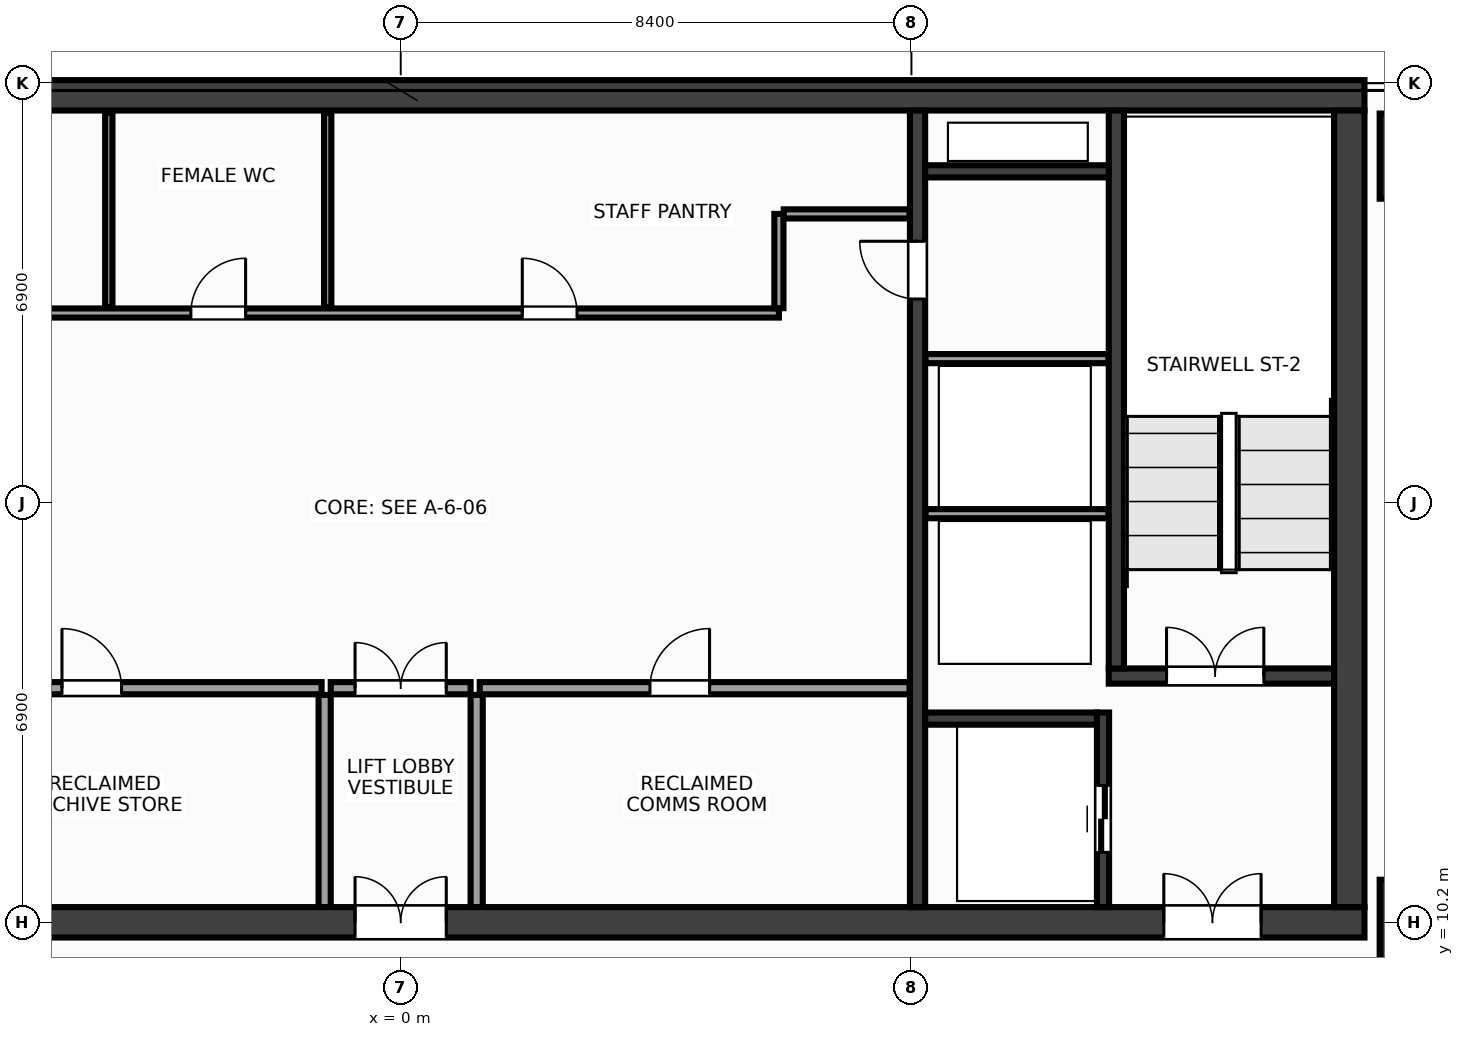
"""IFC4 building model, lengths in metres.
Left out: names, types, materials, properties, quantities, classifications, styles, units other than length and angle.
Written with IfcOpenShell. Run it as: python <this file> out.ifc"""

import sys

from ifc_helpers import new_model, si_unit, direction, frame, frame_2d, origin, origin_2d, place, context, subcontext, project, spatial, rectangle, extrude, source, transform, mapped, element, fill, save


model = new_model("IFC4")
c1 = context("Model", 3, precision=1e-05, world=origin(), true_north=direction((0.0, 1.0)))
c2 = subcontext(c1, "Body", "Model", "MODEL_VIEW")
j1 = project(units=[si_unit("LENGTHUNIT", "METRE"), si_unit("PLANEANGLEUNIT", "RADIAN")], contexts=[c1])
p1 = place(None, origin())
s1 = spatial("IfcSite", under=j1, at=p1, CompositionType="ELEMENT")
p2 = place(p1, origin())
s2 = spatial("IfcBuilding", under=s1, at=p2, CompositionType="ELEMENT")
p3 = place(p2, frame((0.0, 0.0, 196.4)))
s3 = spatial("IfcBuildingStorey", under=s2, at=p3, CompositionType="ELEMENT", Elevation=196.4)
m1 = source(origin(), c2, "Body", "SweptSolid", [
    extrude(rectangle(XDim=31.7, YDim=0.5, at=frame_2d((15.85, 0.0))), origin(), (0.0, 0.0, 1.0), 3.6),
])
p4 = place(p3, frame((-15.85, 23.8, 0.0), z_axis=(0.0, 0.0, 1.0), x_axis=(1.0, 0.0, 0.0)))
e1 = element("IfcWall", 1, at=p4, inside=s3, PredefinedType="SHEAR", context=c2, shape_type="MappedRepresentation", body=[
    mapped(m1, transform((0.0, 0.0, 0.0), x_axis=(1.0, 0.0, 0.0), y_axis=(0.0, 1.0, 0.0), z_axis=(0.0, 0.0, 1.0), scale=1.0)),
])
p5 = place(p3, frame((-15.85, 10.2, 0.0), z_axis=(0.0, 0.0, 1.0), x_axis=(1.0, 0.0, 0.0)))
e2 = element("IfcWall", 2, at=p5, inside=s3, PredefinedType="SHEAR", context=c2, shape_type="MappedRepresentation", body=[
    mapped(m1, transform((0.0, 0.0, 0.0), x_axis=(1.0, 0.0, 0.0), y_axis=(0.0, 1.0, 0.0), z_axis=(0.0, 0.0, 1.0), scale=1.0)),
])
p6 = place(p5, frame((1.7, 0.0, 0.0)))
e3 = element("IfcOpeningElement", 3, at=p6, cuts=e2, PredefinedType="OPENING", context=c2, shape_type="SweptSolid", body=[
    extrude(rectangle(XDim=1.6, YDim=2.15, at=frame_2d((0.8, 1.075))), frame((0.0, 0.262, 0.0), z_axis=(0.0, -1.0, 0.0), x_axis=(1.0, 0.0, 0.0)), (0.0, 0.0, 1.0), 0.524),
])
p7 = place(p5, frame((28.4, 0.0, 0.0)))
e4 = element("IfcOpeningElement", 4, at=p7, cuts=e2, PredefinedType="OPENING", context=c2, shape_type="SweptSolid", body=[
    extrude(rectangle(XDim=1.6, YDim=2.15, at=frame_2d((0.8, 1.075))), frame((0.0, 0.262, 0.0), z_axis=(0.0, -1.0, 0.0), x_axis=(1.0, 0.0, 0.0)), (0.0, 0.0, 1.0), 0.524),
])
p8 = place(p5, frame((15.1, 0.0, 0.0)))
e5 = element("IfcOpeningElement", 5, at=p8, cuts=e2, PredefinedType="OPENING", context=c2, shape_type="SweptSolid", body=[
    extrude(rectangle(XDim=1.5, YDim=2.2, at=frame_2d((0.75, 1.1))), frame((0.0, 0.262, 0.0), z_axis=(0.0, -1.0, 0.0), x_axis=(1.0, 0.0, 0.0)), (0.0, 0.0, 1.0), 0.524),
])
m2 = source(origin(), c2, "Body", "SweptSolid", [
    extrude(rectangle(XDim=13.1, YDim=0.5, at=frame_2d((6.55, 0.0))), origin(), (0.0, 0.0, 1.0), 3.6),
])
p9 = place(p3, frame((15.6, 10.45, 0.0), z_axis=(0.0, 0.0, 1.0), x_axis=(0.0, 1.0, 0.0)))
e6 = element("IfcWall", 6, at=p9, inside=s3, PredefinedType="SHEAR", context=c2, shape_type="MappedRepresentation", body=[
    mapped(m2, transform((0.0, 0.0, 0.0), x_axis=(1.0, 0.0, 0.0), y_axis=(0.0, 1.0, 0.0), z_axis=(0.0, 0.0, 1.0), scale=1.0)),
])
m3 = source(origin(), c2, "Body", "SweptSolid", [
    extrude(rectangle(XDim=13.1, YDim=0.25, at=frame_2d((6.55, 0.0))), origin(), (0.0, 0.0, 1.0), 3.6),
])
p10 = place(p3, frame((8.5, 10.45, 0.0), z_axis=(0.0, 0.0, 1.0), x_axis=(0.0, 1.0, 0.0)))
e7 = element("IfcWall", 7, at=p10, inside=s3, PredefinedType="SHEAR", context=c2, shape_type="MappedRepresentation", body=[
    mapped(m3, transform((0.0, 0.0, 0.0), x_axis=(1.0, 0.0, 0.0), y_axis=(0.0, 1.0, 0.0), z_axis=(0.0, 0.0, 1.0), scale=1.0)),
])
p11 = place(p10, frame((10.0, 0.0, 0.0)))
e8 = element("IfcOpeningElement", 8, at=p11, cuts=e7, PredefinedType="OPENING", context=c2, shape_type="SweptSolid", body=[
    extrude(rectangle(XDim=0.95, YDim=2.15, at=frame_2d((0.475, 1.075))), frame((0.0, 0.137, 0.0), z_axis=(0.0, -1.0, 0.0), x_axis=(1.0, 0.0, 0.0)), (0.0, 0.0, 1.0), 0.274),
])
m4 = source(origin(), c2, "Body", "SweptSolid", [
    extrude(rectangle(XDim=3.705, YDim=0.25, at=frame_2d((1.853, 0.0))), origin(), (0.0, 0.0, 1.0), 3.6),
])
p12 = place(p3, frame((11.645, 14.25, 0.0), z_axis=(0.0, 0.0, 1.0), x_axis=(1.0, 0.0, 0.0)))
e9 = element("IfcWall", 9, at=p12, inside=s3, PredefinedType="SHEAR", context=c2, shape_type="MappedRepresentation", body=[
    mapped(m4, transform((0.0, 0.0, 0.0), x_axis=(1.0, 0.0, 0.0), y_axis=(0.0, 1.0, 0.0), z_axis=(0.0, 0.0, 1.0), scale=1.0)),
])
p13 = place(p12, frame((0.95, 0.0, 0.0)))
e10 = element("IfcOpeningElement", 10, at=p13, cuts=e9, PredefinedType="OPENING", context=c2, shape_type="SweptSolid", body=[
    extrude(rectangle(XDim=1.6, YDim=2.15, at=frame_2d((0.8, 1.075))), frame((0.0, 0.137, 0.0), z_axis=(0.0, -1.0, 0.0), x_axis=(1.0, 0.0, 0.0)), (0.0, 0.0, 1.0), 0.274),
])
m5 = source(origin(), c2, "Body", "SweptSolid", [
    extrude(rectangle(XDim=9.175, YDim=0.25, at=frame_2d((4.587, 0.0))), origin(), (0.0, 0.0, 1.0), 3.6),
])
p14 = place(p3, frame((11.77, 14.375, 0.0), z_axis=(0.0, 0.0, 1.0), x_axis=(0.0, 1.0, 0.0)))
e11 = element("IfcWall", 11, at=p14, inside=s3, PredefinedType="SHEAR", context=c2, shape_type="MappedRepresentation", body=[
    mapped(m5, transform((0.0, 0.0, 0.0), x_axis=(1.0, 0.0, 0.0), y_axis=(0.0, 1.0, 0.0), z_axis=(0.0, 0.0, 1.0), scale=1.0)),
])
m6 = source(origin(), c2, "Body", "SweptSolid", [
    extrude(rectangle(XDim=3.2, YDim=0.2, at=frame_2d((1.6, 0.0))), origin(), (0.0, 0.0, 1.0), 3.6),
])
p15 = place(p3, frame((11.55, 10.45, 0.0), z_axis=(0.0, 0.0, 1.0), x_axis=(0.0, 1.0, 0.0)))
e12 = element("IfcWall", 12, at=p15, inside=s3, PredefinedType="SHEAR", context=c2, shape_type="MappedRepresentation", body=[
    mapped(m6, transform((0.0, 0.0, 0.0), x_axis=(1.0, 0.0, 0.0), y_axis=(0.0, 1.0, 0.0), z_axis=(0.0, 0.0, 1.0), scale=1.0)),
])
p16 = place(p15, frame((0.9, 0.0, 0.0)))
e13 = element("IfcOpeningElement", 13, at=p16, cuts=e12, PredefinedType="OPENING", context=c2, shape_type="SweptSolid", body=[
    extrude(rectangle(XDim=1.1, YDim=2.15, at=frame_2d((0.55, 1.075))), frame((0.0, 0.112, 0.0), z_axis=(0.0, -1.0, 0.0), x_axis=(1.0, 0.0, 0.0)), (0.0, 0.0, 1.0), 0.224),
])
m7 = source(origin(), c2, "Body", "SweptSolid", [
    extrude(rectangle(XDim=2.825, YDim=0.2, at=frame_2d((1.413, 0.0))), origin(), (0.0, 0.0, 1.0), 3.6),
])
p17 = place(p3, frame((8.625, 13.55, 0.0), z_axis=(0.0, 0.0, 1.0), x_axis=(1.0, 0.0, 0.0)))
e14 = element("IfcWall", 14, at=p17, inside=s3, PredefinedType="SHEAR", context=c2, shape_type="MappedRepresentation", body=[
    mapped(m7, transform((0.0, 0.0, 0.0), x_axis=(1.0, 0.0, 0.0), y_axis=(0.0, 1.0, 0.0), z_axis=(0.0, 0.0, 1.0), scale=1.0)),
])
m8 = source(origin(), c2, "Body", "SweptSolid", [
    extrude(rectangle(XDim=3.02, YDim=0.2, at=frame_2d((1.51, 0.0))), origin(), (0.0, 0.0, 1.0), 3.6),
])
p18 = place(p3, frame((8.625, 22.55, 0.0), z_axis=(0.0, 0.0, 1.0), x_axis=(1.0, 0.0, 0.0)))
e15 = element("IfcWall", 15, at=p18, inside=s3, PredefinedType="SHEAR", context=c2, shape_type="MappedRepresentation", body=[
    mapped(m8, transform((0.0, 0.0, 0.0), x_axis=(1.0, 0.0, 0.0), y_axis=(0.0, 1.0, 0.0), z_axis=(0.0, 0.0, 1.0), scale=1.0)),
])
m9 = source(origin(), c2, "Body", "SweptSolid", [
    extrude(rectangle(XDim=1.4, YDim=1.4, at=origin_2d()), origin(), (0.0, 0.0, 1.0), 3.6),
])
for number, where, z_axis, x_axis in (
    (16, (16.8, 10.2, 0.0), (0.0, 0.0, 1.0), (1.0, 0.0, 0.0)),
    (17, (16.8, 22.8, 0.0), (0.0, 0.0, 1.0), (1.0, 0.0, 0.0)),
):
    element("IfcColumn", number, at=place(p3, frame(where, z_axis=z_axis, x_axis=x_axis)), inside=s3, PredefinedType="COLUMN", context=c2, shape_type="MappedRepresentation", body=[
        mapped(m9, transform((0.0, 0.0, 0.0), x_axis=(1.0, 0.0, 0.0), y_axis=(0.0, 1.0, 0.0), z_axis=(0.0, 0.0, 1.0), scale=1.0)),
    ])
m10 = source(origin(), c2, "Body", "SweptSolid", [
    extrude(rectangle(XDim=3.01, YDim=0.15, at=frame_2d((1.505, 0.0))), origin(), (0.0, 0.0, 1.0), 3.38),
])
for number, where, z_axis, x_axis in (
    (18, (8.63, 16.92, 0.0), (0.0, 0.0, 1.0), (1.0, 0.0, 0.0)),
    (19, (8.63, 19.47, 0.0), (0.0, 0.0, 1.0), (1.0, 0.0, 0.0)),
):
    element("IfcWall", number, at=place(p3, frame(where, z_axis=z_axis, x_axis=x_axis)), inside=s3, PredefinedType="PARTITIONING", context=c2, shape_type="MappedRepresentation", body=[
        mapped(m10, transform((0.0, 0.0, 0.0), x_axis=(1.0, 0.0, 0.0), y_axis=(0.0, 1.0, 0.0), z_axis=(0.0, 0.0, 1.0), scale=1.0)),
    ])
m11 = source(origin(), c2, "Body", "SweptSolid", [
    extrude(rectangle(XDim=7.07, YDim=0.2, at=frame_2d((3.535, 0.0))), origin(), (0.0, 0.0, 1.0), 3.38),
])
p19 = place(p3, frame((-8.37, 14.05, 0.0), z_axis=(0.0, 0.0, 1.0), x_axis=(1.0, 0.0, 0.0)))
e20 = element("IfcWall", 20, at=p19, inside=s3, PredefinedType="PARTITIONING", context=c2, shape_type="MappedRepresentation", body=[
    mapped(m11, transform((0.0, 0.0, 0.0), x_axis=(1.0, 0.0, 0.0), y_axis=(0.0, 1.0, 0.0), z_axis=(0.0, 0.0, 1.0), scale=1.0)),
])
p20 = place(p19, frame((2.8, 0.0, 0.0)))
e21 = element("IfcOpeningElement", 21, at=p20, cuts=e20, PredefinedType="OPENING", context=c2, shape_type="SweptSolid", body=[
    extrude(rectangle(XDim=0.98, YDim=2.15, at=frame_2d((0.49, 1.075))), frame((0.0, 0.112, 0.0), z_axis=(0.0, -1.0, 0.0), x_axis=(1.0, 0.0, 0.0)), (0.0, 0.0, 1.0), 0.224),
])
p21 = place(p3, frame((1.3, 14.05, 0.0), z_axis=(0.0, 0.0, 1.0), x_axis=(1.0, 0.0, 0.0)))
e22 = element("IfcWall", 22, at=p21, inside=s3, PredefinedType="PARTITIONING", context=c2, shape_type="MappedRepresentation", body=[
    mapped(m11, transform((0.0, 0.0, 0.0), x_axis=(1.0, 0.0, 0.0), y_axis=(0.0, 1.0, 0.0), z_axis=(0.0, 0.0, 1.0), scale=1.0)),
])
p22 = place(p21, frame((2.8, 0.0, 0.0)))
e23 = element("IfcOpeningElement", 23, at=p22, cuts=e22, PredefinedType="OPENING", context=c2, shape_type="SweptSolid", body=[
    extrude(rectangle(XDim=0.98, YDim=2.15, at=frame_2d((0.49, 1.075))), frame((0.0, 0.112, 0.0), z_axis=(0.0, -1.0, 0.0), x_axis=(1.0, 0.0, 0.0)), (0.0, 0.0, 1.0), 0.224),
])
m12 = source(origin(), c2, "Body", "SweptSolid", [
    extrude(rectangle(XDim=3.49, YDim=0.2, at=frame_2d((1.745, 0.0))), origin(), (0.0, 0.0, 1.0), 3.38),
])
for number, where, z_axis, x_axis in (
    (24, (-1.25, 10.45, 0.0), (0.0, 0.0, 1.0), (0.0, 1.0, 0.0)),
    (25, (1.25, 10.45, 0.0), (0.0, 0.0, 1.0), (0.0, 1.0, 0.0)),
):
    element("IfcWall", number, at=place(p3, frame(where, z_axis=z_axis, x_axis=x_axis)), inside=s3, PredefinedType="PARTITIONING", context=c2, shape_type="MappedRepresentation", body=[
        mapped(m12, transform((0.0, 0.0, 0.0), x_axis=(1.0, 0.0, 0.0), y_axis=(0.0, 1.0, 0.0), z_axis=(0.0, 0.0, 1.0), scale=1.0)),
    ])
m13 = source(origin(), c2, "Body", "SweptSolid", [
    extrude(rectangle(XDim=2.3, YDim=0.2, at=frame_2d((1.15, 0.0))), origin(), (0.0, 0.0, 1.0), 3.38),
])
p23 = place(p3, frame((-1.15, 14.05, 0.0), z_axis=(0.0, 0.0, 1.0), x_axis=(1.0, 0.0, 0.0)))
e26 = element("IfcWall", 26, at=p23, inside=s3, PredefinedType="PARTITIONING", context=c2, shape_type="MappedRepresentation", body=[
    mapped(m13, transform((0.0, 0.0, 0.0), x_axis=(1.0, 0.0, 0.0), y_axis=(0.0, 1.0, 0.0), z_axis=(0.0, 0.0, 1.0), scale=1.0)),
])
p24 = place(p23, frame((0.4, 0.0, 0.0)))
e27 = element("IfcOpeningElement", 27, at=p24, cuts=e26, PredefinedType="OPENING", context=c2, shape_type="SweptSolid", body=[
    extrude(rectangle(XDim=1.5, YDim=2.2, at=frame_2d((0.75, 1.1))), frame((0.0, 0.112, 0.0), z_axis=(0.0, -1.0, 0.0), x_axis=(1.0, 0.0, 0.0)), (0.0, 0.0, 1.0), 0.224),
])
m14 = source(origin(), c2, "Body", "SweptSolid", [
    extrude(rectangle(XDim=14.59, YDim=0.15, at=frame_2d((7.295, 0.0))), origin(), (0.0, 0.0, 1.0), 3.38),
])
p25 = place(p3, frame((-8.37, 20.22, 0.0), z_axis=(0.0, 0.0, 1.0), x_axis=(1.0, 0.0, 0.0)))
e28 = element("IfcWall", 28, at=p25, inside=s3, PredefinedType="PARTITIONING", context=c2, shape_type="MappedRepresentation", body=[
    mapped(m14, transform((0.0, 0.0, 0.0), x_axis=(1.0, 0.0, 0.0), y_axis=(0.0, 1.0, 0.0), z_axis=(0.0, 0.0, 1.0), scale=1.0)),
])
p26 = place(p25, frame((1.36, 0.0, 0.0)))
e29 = element("IfcOpeningElement", 29, at=p26, cuts=e28, PredefinedType="OPENING", context=c2, shape_type="SweptSolid", body=[
    extrude(rectangle(XDim=0.9, YDim=2.15, at=frame_2d((0.45, 1.075))), frame((0.0, 0.087, 0.0), z_axis=(0.0, -1.0, 0.0), x_axis=(1.0, 0.0, 0.0)), (0.0, 0.0, 1.0), 0.174),
])
p27 = place(p25, frame((4.92, 0.0, 0.0)))
e30 = element("IfcOpeningElement", 30, at=p27, cuts=e28, PredefinedType="OPENING", context=c2, shape_type="SweptSolid", body=[
    extrude(rectangle(XDim=0.9, YDim=2.15, at=frame_2d((0.45, 1.075))), frame((0.0, 0.087, 0.0), z_axis=(0.0, -1.0, 0.0), x_axis=(1.0, 0.0, 0.0)), (0.0, 0.0, 1.0), 0.174),
])
p28 = place(p25, frame((10.37, 0.0, 0.0)))
e31 = element("IfcOpeningElement", 31, at=p28, cuts=e28, PredefinedType="OPENING", context=c2, shape_type="SweptSolid", body=[
    extrude(rectangle(XDim=0.9, YDim=2.15, at=frame_2d((0.45, 1.075))), frame((0.0, 0.087, 0.0), z_axis=(0.0, -1.0, 0.0), x_axis=(1.0, 0.0, 0.0)), (0.0, 0.0, 1.0), 0.174),
])
m15 = source(origin(), c2, "Body", "SweptSolid", [
    extrude(rectangle(XDim=1.55, YDim=0.15, at=frame_2d((0.775, 0.0))), origin(), (0.0, 0.0, 1.0), 3.38),
])
p29 = place(p3, frame((6.22, 20.3, 0.0), z_axis=(0.0, 0.0, 1.0), x_axis=(0.0, 1.0, 0.0)))
e32 = element("IfcWall", 32, at=p29, inside=s3, PredefinedType="PARTITIONING", context=c2, shape_type="MappedRepresentation", body=[
    mapped(m15, transform((0.0, 0.0, 0.0), x_axis=(1.0, 0.0, 0.0), y_axis=(0.0, 1.0, 0.0), z_axis=(0.0, 0.0, 1.0), scale=1.0)),
])
m16 = source(origin(), c2, "Body", "SweptSolid", [
    extrude(rectangle(XDim=2.07, YDim=0.15, at=frame_2d((1.035, 0.0))), origin(), (0.0, 0.0, 1.0), 3.38),
])
p30 = place(p3, frame((6.3, 21.85, 0.0), z_axis=(0.0, 0.0, 1.0), x_axis=(1.0, 0.0, 0.0)))
e33 = element("IfcWall", 33, at=p30, inside=s3, PredefinedType="PARTITIONING", context=c2, shape_type="MappedRepresentation", body=[
    mapped(m16, transform((0.0, 0.0, 0.0), x_axis=(1.0, 0.0, 0.0), y_axis=(0.0, 1.0, 0.0), z_axis=(0.0, 0.0, 1.0), scale=1.0)),
])
m17 = source(origin(), c2, "Body", "SweptSolid", [
    extrude(rectangle(XDim=3.19, YDim=0.12, at=frame_2d((1.595, 0.0))), origin(), (0.0, 0.0, 1.0), 3.38),
])
for number, where, z_axis, x_axis in (
    (34, (-4.8, 20.32, 0.0), (0.0, 0.0, 1.0), (0.0, 1.0, 0.0)),
    (35, (-1.2, 20.32, 0.0), (0.0, 0.0, 1.0), (0.0, 1.0, 0.0)),
):
    element("IfcWall", number, at=place(p3, frame(where, z_axis=z_axis, x_axis=x_axis)), inside=s3, PredefinedType="PARTITIONING", context=c2, shape_type="MappedRepresentation", body=[
        mapped(m17, transform((0.0, 0.0, 0.0), x_axis=(1.0, 0.0, 0.0), y_axis=(0.0, 1.0, 0.0), z_axis=(0.0, 0.0, 1.0), scale=1.0)),
    ])
m18 = source(origin(), c2, "Body", "SweptSolid", [
    extrude(rectangle(XDim=1.6, YDim=2.15, at=frame_2d((0.8, 1.075))), frame((0.0, 0.025, 0.0), z_axis=(0.0, -1.0, 0.0), x_axis=(1.0, 0.0, 0.0)), (0.0, 0.0, 1.0), 0.05),
])
p31 = place(p13, origin())
e36 = element("IfcDoor", 36, at=p31, inside=s3, OperationType="DOUBLE_DOOR_SINGLE_SWING", PredefinedType="DOOR", context=c2, shape_type="MappedRepresentation", body=[
    mapped(m18, transform((0.0, 0.0, 0.0), x_axis=(1.0, 0.0, 0.0), y_axis=(0.0, 1.0, 0.0), z_axis=(0.0, 0.0, 1.0), scale=1.0)),
])
fill(e10, e36)
p32 = place(p7, origin())
e37 = element("IfcDoor", 37, at=p32, inside=s3, OperationType="DOUBLE_DOOR_SINGLE_SWING", PredefinedType="DOOR", context=c2, shape_type="MappedRepresentation", body=[
    mapped(m18, transform((0.0, 0.0, 0.0), x_axis=(1.0, 0.0, 0.0), y_axis=(0.0, 1.0, 0.0), z_axis=(0.0, 0.0, 1.0), scale=1.0)),
])
fill(e4, e37)
m19 = source(origin(), c2, "Body", "SweptSolid", [
    extrude(rectangle(XDim=1.1, YDim=2.15, at=frame_2d((0.55, 1.075))), frame((0.0, 0.025, 0.0), z_axis=(0.0, -1.0, 0.0), x_axis=(1.0, 0.0, 0.0)), (0.0, 0.0, 1.0), 0.05),
])
p33 = place(p16, origin())
e38 = element("IfcDoor", 38, at=p33, inside=s3, OperationType="DOUBLE_DOOR_SLIDING", PredefinedType="DOOR", context=c2, shape_type="MappedRepresentation", body=[
    mapped(m19, transform((0.0, 0.0, 0.0), x_axis=(1.0, 0.0, 0.0), y_axis=(0.0, 1.0, 0.0), z_axis=(0.0, 0.0, 1.0), scale=1.0)),
])
fill(e13, e38)
m20 = source(origin(), c2, "Body", "SweptSolid", [
    extrude(rectangle(XDim=0.95, YDim=2.15, at=frame_2d((0.475, 1.075))), frame((0.0, 0.025, 0.0), z_axis=(0.0, -1.0, 0.0), x_axis=(1.0, 0.0, 0.0)), (0.0, 0.0, 1.0), 0.05),
])
p34 = place(p11, origin())
e39 = element("IfcDoor", 39, at=p34, inside=s3, OperationType="SINGLE_SWING_RIGHT", PredefinedType="DOOR", context=c2, shape_type="MappedRepresentation", body=[
    mapped(m20, transform((0.0, 0.0, 0.0), x_axis=(1.0, 0.0, 0.0), y_axis=(0.0, 1.0, 0.0), z_axis=(0.0, 0.0, 1.0), scale=1.0)),
])
fill(e8, e39)
m21 = source(origin(), c2, "Body", "SweptSolid", [
    extrude(rectangle(XDim=0.98, YDim=2.15, at=frame_2d((0.49, 1.075))), frame((0.0, 0.025, 0.0), z_axis=(0.0, -1.0, 0.0), x_axis=(1.0, 0.0, 0.0)), (0.0, 0.0, 1.0), 0.05),
])
p35 = place(p20, origin())
e40 = element("IfcDoor", 40, at=p35, inside=s3, OperationType="SINGLE_SWING_LEFT", PredefinedType="DOOR", context=c2, shape_type="MappedRepresentation", body=[
    mapped(m21, transform((0.0, 0.0, 0.0), x_axis=(1.0, 0.0, 0.0), y_axis=(0.0, 1.0, 0.0), z_axis=(0.0, 0.0, 1.0), scale=1.0)),
])
fill(e21, e40)
p36 = place(p22, origin())
e41 = element("IfcDoor", 41, at=p36, inside=s3, OperationType="SINGLE_SWING_RIGHT", PredefinedType="DOOR", context=c2, shape_type="MappedRepresentation", body=[
    mapped(m21, transform((0.0, 0.0, 0.0), x_axis=(1.0, 0.0, 0.0), y_axis=(0.0, 1.0, 0.0), z_axis=(0.0, 0.0, 1.0), scale=1.0)),
])
fill(e23, e41)
m22 = source(origin(), c2, "Body", "SweptSolid", [
    extrude(rectangle(XDim=1.5, YDim=2.2, at=frame_2d((0.75, 1.1))), frame((0.0, 0.025, 0.0), z_axis=(0.0, -1.0, 0.0), x_axis=(1.0, 0.0, 0.0)), (0.0, 0.0, 1.0), 0.05),
])
p37 = place(p24, origin())
e42 = element("IfcDoor", 42, at=p37, inside=s3, OperationType="DOUBLE_DOOR_SINGLE_SWING", PredefinedType="DOOR", context=c2, shape_type="MappedRepresentation", body=[
    mapped(m22, transform((0.0, 0.0, 0.0), x_axis=(1.0, 0.0, 0.0), y_axis=(0.0, 1.0, 0.0), z_axis=(0.0, 0.0, 1.0), scale=1.0)),
])
fill(e27, e42)
p38 = place(p8, origin())
e43 = element("IfcDoor", 43, at=p38, inside=s3, OperationType="DOUBLE_DOOR_SINGLE_SWING", PredefinedType="DOOR", context=c2, shape_type="MappedRepresentation", body=[
    mapped(m22, transform((0.0, 0.0, 0.0), x_axis=(1.0, 0.0, 0.0), y_axis=(0.0, 1.0, 0.0), z_axis=(0.0, 0.0, 1.0), scale=1.0)),
])
fill(e5, e43)
m23 = source(origin(), c2, "Body", "SweptSolid", [
    extrude(rectangle(XDim=0.9, YDim=2.15, at=frame_2d((0.45, 1.075))), frame((0.0, 0.025, 0.0), z_axis=(0.0, -1.0, 0.0), x_axis=(1.0, 0.0, 0.0)), (0.0, 0.0, 1.0), 0.05),
])
p39 = place(p27, origin())
e44 = element("IfcDoor", 44, at=p39, inside=s3, OperationType="SINGLE_SWING_RIGHT", PredefinedType="DOOR", context=c2, shape_type="MappedRepresentation", body=[
    mapped(m23, transform((0.0, 0.0, 0.0), x_axis=(1.0, 0.0, 0.0), y_axis=(0.0, 1.0, 0.0), z_axis=(0.0, 0.0, 1.0), scale=1.0)),
])
fill(e30, e44)
p40 = place(p28, origin())
e45 = element("IfcDoor", 45, at=p40, inside=s3, OperationType="SINGLE_SWING_LEFT", PredefinedType="DOOR", context=c2, shape_type="MappedRepresentation", body=[
    mapped(m23, transform((0.0, 0.0, 0.0), x_axis=(1.0, 0.0, 0.0), y_axis=(0.0, 1.0, 0.0), z_axis=(0.0, 0.0, 1.0), scale=1.0)),
])
fill(e31, e45)
save(model, sys.argv[1])
